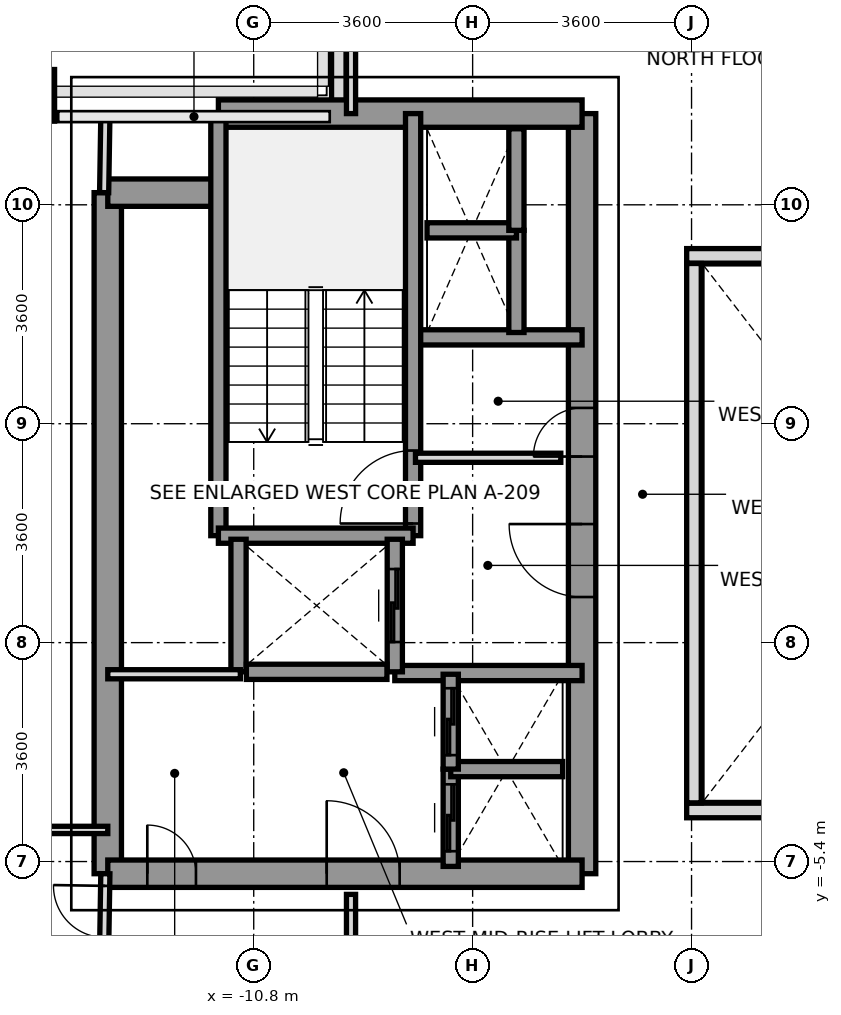
"""IFC4 building model, lengths in metres.
Left out: names, types, materials, properties, quantities, classifications, styles, units other than length and angle.
Written with IfcOpenShell. Run it as: python <this file> out.ifc"""

import sys

from ifc_helpers import new_model, si_unit, direction, frame, frame_2d, origin, origin_2d, place, context, subcontext, project, spatial, rectangle, extrude, source, transform, mapped, element, fill, save


model = new_model("IFC4")
c1 = context("Model", 3, precision=1e-05, world=origin(), true_north=direction((0.0, 1.0)))
c2 = subcontext(c1, "Body", "Model", "MODEL_VIEW")
j1 = project(units=[si_unit("LENGTHUNIT", "METRE"), si_unit("PLANEANGLEUNIT", "RADIAN")], contexts=[c1])
p1 = place(None, origin())
s1 = spatial("IfcSite", under=j1, at=p1, CompositionType="ELEMENT")
p2 = place(p1, origin())
s2 = spatial("IfcBuilding", under=s1, at=p2, CompositionType="ELEMENT")
p3 = place(p2, frame((0.0, 0.0, 141.4)))
s3 = spatial("IfcBuildingStorey", under=s2, at=p3, CompositionType="ELEMENT", Elevation=141.4)
m1 = source(origin(), c2, "Body", "SweptSolid", [
    extrude(rectangle(XDim=0.65, YDim=0.85, at=origin_2d()), origin(), (0.0, 0.0, 1.0), 3.2),
])
p4 = place(p3, frame((-14.4, 7.2, 0.0), z_axis=(0.0, 0.0, 1.0), x_axis=(1.0, 0.0, 0.0)))
e1 = element("IfcColumn", 1, at=p4, inside=s3, PredefinedType="COLUMN", context=c2, shape_type="MappedRepresentation", body=[
    mapped(m1, transform((0.0, 0.0, 0.0), x_axis=(1.0, 0.0, 0.0), y_axis=(0.0, 1.0, 0.0), z_axis=(0.0, 0.0, 1.0), scale=1.0)),
])
p5 = place(p3, frame((-9.4, 6.953, 0.0), z_axis=(0.0, 0.0, 1.0), x_axis=(0.0, 1.0, 0.0)))
e2 = element("IfcWall", 2, at=p5, inside=s3, PredefinedType="PARAPET", context=c2, shape_type="SweptSolid", body=[
    extrude(rectangle(XDim=1.519, YDim=0.24, at=frame_2d((0.76, 0.0))), origin(), (0.0, 0.0, 1.0), 1.15),
])
p6 = place(p3, frame((-13.2, -5.6, 0.0), z_axis=(0.0, 0.0, 1.0), x_axis=(0.0, 1.0, 0.0)))
e3 = element("IfcWall", 3, at=p6, inside=s3, PredefinedType="SHEAR", context=c2, shape_type="SweptSolid", body=[
    extrude(rectangle(XDim=11.2, YDim=0.45, at=frame_2d((5.6, 0.0))), origin(), (0.0, 0.0, 1.0), 3.2),
])
p7 = place(p3, frame((-5.4, -5.6, 0.0), z_axis=(0.0, 0.0, 1.0), x_axis=(0.0, 1.0, 0.0)))
e4 = element("IfcWall", 4, at=p7, inside=s3, PredefinedType="SHEAR", context=c2, shape_type="SweptSolid", body=[
    extrude(rectangle(XDim=12.5, YDim=0.45, at=frame_2d((6.25, 0.0))), origin(), (0.0, 0.0, 1.0), 3.2),
])
p8 = place(p7, frame((4.55, 0.0, 0.0)))
e5 = element("IfcOpeningElement", 5, at=p8, cuts=e4, PredefinedType="OPENING", context=c2, shape_type="SweptSolid", body=[
    extrude(rectangle(XDim=1.2, YDim=2.2, at=frame_2d((0.6, 1.1))), frame((0.0, 0.235, 0.0), z_axis=(0.0, -1.0, 0.0), x_axis=(1.0, 0.0, 0.0)), (0.0, 0.0, 1.0), 0.47),
])
p9 = place(p7, frame((6.86, 0.0, 0.0)))
e6 = element("IfcOpeningElement", 6, at=p9, cuts=e4, PredefinedType="OPENING", context=c2, shape_type="SweptSolid", body=[
    extrude(rectangle(XDim=0.8, YDim=2.1, at=frame_2d((0.4, 1.05))), frame((0.0, 0.235, 0.0), z_axis=(0.0, -1.0, 0.0), x_axis=(1.0, 0.0, 0.0)), (0.0, 0.0, 1.0), 0.47),
])
p10 = place(p3, frame((-11.381, 6.9, 0.0), z_axis=(0.0, 0.0, 1.0), x_axis=(1.0, 0.0, 0.0)))
e7 = element("IfcWall", 7, at=p10, inside=s3, PredefinedType="SHEAR", context=c2, shape_type="SweptSolid", body=[
    extrude(rectangle(XDim=5.981, YDim=0.45, at=frame_2d((2.991, 0.0))), origin(), (0.0, 0.0, 1.0), 3.2),
])
p11 = place(p3, frame((-13.2, 5.6, 0.0), z_axis=(0.0, 0.0, 1.0), x_axis=(1.0, 0.0, 0.0)))
e8 = element("IfcWall", 8, at=p11, inside=s3, PredefinedType="SHEAR", context=c2, shape_type="SweptSolid", body=[
    extrude(rectangle(XDim=1.819, YDim=0.45, at=frame_2d((0.909, 0.0))), origin(), (0.0, 0.0, 1.0), 3.2),
])
p12 = place(p3, frame((-13.2, -5.6, 0.0), z_axis=(0.0, 0.0, 1.0), x_axis=(1.0, 0.0, 0.0)))
e9 = element("IfcWall", 9, at=p12, inside=s3, PredefinedType="SHEAR", context=c2, shape_type="SweptSolid", body=[
    extrude(rectangle(XDim=7.8, YDim=0.45, at=frame_2d((3.9, 0.0))), origin(), (0.0, 0.0, 1.0), 3.2),
])
p13 = place(p12, frame((3.6, 0.0, 0.0)))
e10 = element("IfcOpeningElement", 10, at=p13, cuts=e9, PredefinedType="OPENING", context=c2, shape_type="SweptSolid", body=[
    extrude(rectangle(XDim=1.2, YDim=2.2, at=frame_2d((0.6, 1.1))), frame((0.0, 0.235, 0.0), z_axis=(0.0, -1.0, 0.0), x_axis=(1.0, 0.0, 0.0)), (0.0, 0.0, 1.0), 0.47),
])
p14 = place(p12, frame((0.65, 0.0, 0.0)))
e11 = element("IfcOpeningElement", 11, at=p14, cuts=e9, PredefinedType="OPENING", context=c2, shape_type="SweptSolid", body=[
    extrude(rectangle(XDim=0.8, YDim=2.1, at=frame_2d((0.4, 1.05))), frame((0.0, 0.235, 0.0), z_axis=(0.0, -1.0, 0.0), x_axis=(1.0, 0.0, 0.0)), (0.0, 0.0, 1.0), 0.47),
])
p15 = place(p3, frame((-8.18, 3.22, 0.0), z_axis=(0.0, 0.0, 1.0), x_axis=(1.0, 0.0, 0.0)))
e12 = element("IfcWall", 12, at=p15, inside=s3, PredefinedType="SOLIDWALL", context=c2, shape_type="SweptSolid", body=[
    extrude(rectangle(XDim=2.78, YDim=0.25, at=frame_2d((1.39, 0.0))), origin(), (0.0, 0.0, 1.0), 3.2),
])
p16 = place(p3, frame((-8.48, -2.3, 0.0), z_axis=(0.0, 0.0, 1.0), x_axis=(1.0, 0.0, 0.0)))
e13 = element("IfcWall", 13, at=p16, inside=s3, PredefinedType="SOLIDWALL", context=c2, shape_type="SweptSolid", body=[
    extrude(rectangle(XDim=3.08, YDim=0.25, at=frame_2d((1.54, 0.0))), origin(), (0.0, 0.0, 1.0), 3.2),
])
p17 = place(p3, frame((-8.179, -0.041, 0.0), z_axis=(0.0, 0.0, 1.0), x_axis=(0.0, 1.0, 0.0)))
e14 = element("IfcWall", 14, at=p17, inside=s3, PredefinedType="SOLIDWALL", context=c2, shape_type="SweptSolid", body=[
    extrude(rectangle(XDim=6.941, YDim=0.25, at=frame_2d((3.47, 0.0))), origin(), (0.0, 0.0, 1.0), 3.2),
])
p18 = place(p17, frame((0.2, 0.0, 0.0)))
e15 = element("IfcOpeningElement", 15, at=p18, cuts=e14, PredefinedType="OPENING", context=c2, shape_type="SweptSolid", body=[
    extrude(rectangle(XDim=1.2, YDim=2.2, at=frame_2d((0.6, 1.1))), frame((0.0, 0.135, 0.0), z_axis=(0.0, -1.0, 0.0), x_axis=(1.0, 0.0, 0.0)), (0.0, 0.0, 1.0), 0.27),
])
p19 = place(p3, frame((-11.381, -0.041, 0.0), z_axis=(0.0, 0.0, 1.0), x_axis=(0.0, 1.0, 0.0)))
e16 = element("IfcWall", 16, at=p19, inside=s3, PredefinedType="SOLIDWALL", context=c2, shape_type="SweptSolid", body=[
    extrude(rectangle(XDim=6.941, YDim=0.25, at=frame_2d((3.47, 0.0))), origin(), (0.0, 0.0, 1.0), 3.2),
])
p20 = place(p3, frame((-11.381, -0.041, 0.0), z_axis=(0.0, 0.0, 1.0), x_axis=(1.0, 0.0, 0.0)))
e17 = element("IfcWall", 17, at=p20, inside=s3, PredefinedType="SOLIDWALL", context=c2, shape_type="SweptSolid", body=[
    extrude(rectangle(XDim=3.202, YDim=0.25, at=frame_2d((1.601, 0.0))), origin(), (0.0, 0.0, 1.0), 3.2),
])
p21 = place(p3, frame((-11.05, -2.28, 0.0), z_axis=(0.0, 0.0, 1.0), x_axis=(0.0, 1.0, 0.0)))
e18 = element("IfcWall", 18, at=p21, inside=s3, PredefinedType="SOLIDWALL", context=c2, shape_type="SweptSolid", body=[
    extrude(rectangle(XDim=2.18, YDim=0.25, at=frame_2d((1.09, 0.0))), origin(), (0.0, 0.0, 1.0), 3.2),
])
p22 = place(p3, frame((-8.48, -2.28, 0.0), z_axis=(0.0, 0.0, 1.0), x_axis=(0.0, 1.0, 0.0)))
e19 = element("IfcWall", 19, at=p22, inside=s3, PredefinedType="SOLIDWALL", context=c2, shape_type="SweptSolid", body=[
    extrude(rectangle(XDim=2.18, YDim=0.25, at=frame_2d((1.09, 0.0))), origin(), (0.0, 0.0, 1.0), 3.2),
])
p23 = place(p22, frame((0.49, 0.0, 0.0)))
e20 = element("IfcOpeningElement", 20, at=p23, cuts=e19, PredefinedType="OPENING", context=c2, shape_type="SweptSolid", body=[
    extrude(rectangle(XDim=1.2, YDim=2.2, at=frame_2d((0.6, 1.1))), frame((0.0, 0.135, 0.0), z_axis=(0.0, -1.0, 0.0), x_axis=(1.0, 0.0, 0.0)), (0.0, 0.0, 1.0), 0.27),
])
p24 = place(p3, frame((-10.921, -2.28, 0.0), z_axis=(0.0, 0.0, 1.0), x_axis=(1.0, 0.0, 0.0)))
e21 = element("IfcWall", 21, at=p24, inside=s3, PredefinedType="SOLIDWALL", context=c2, shape_type="SweptSolid", body=[
    extrude(rectangle(XDim=2.312, YDim=0.25, at=frame_2d((1.156, 0.0))), origin(), (0.0, 0.0, 1.0), 3.2),
])
p25 = place(p3, frame((-7.56, -5.48, 0.0), z_axis=(0.0, 0.0, 1.0), x_axis=(0.0, 1.0, 0.0)))
e22 = element("IfcWall", 22, at=p25, inside=s3, PredefinedType="SOLIDWALL", context=c2, shape_type="SweptSolid", body=[
    extrude(rectangle(XDim=1.6, YDim=0.25, at=frame_2d((0.8, 0.0))), origin(), (0.0, 0.0, 1.0), 3.2),
])
p26 = place(p25, frame((0.25, 0.0, 0.0)))
e23 = element("IfcOpeningElement", 23, at=p26, cuts=e22, PredefinedType="OPENING", context=c2, shape_type="SweptSolid", body=[
    extrude(rectangle(XDim=1.1, YDim=2.2, at=frame_2d((0.55, 1.1))), frame((0.0, 0.135, 0.0), z_axis=(0.0, -1.0, 0.0), x_axis=(1.0, 0.0, 0.0)), (0.0, 0.0, 1.0), 0.27),
])
p27 = place(p3, frame((-7.56, -3.88, 0.0), z_axis=(0.0, 0.0, 1.0), x_axis=(1.0, 0.0, 0.0)))
e24 = element("IfcWall", 24, at=p27, inside=s3, PredefinedType="SOLIDWALL", context=c2, shape_type="SweptSolid", body=[
    extrude(rectangle(XDim=1.84, YDim=0.25, at=frame_2d((0.92, 0.0))), origin(), (0.0, 0.0, 1.0), 3.2),
])
p28 = place(p3, frame((-7.56, -3.88, 0.0), z_axis=(0.0, 0.0, 1.0), x_axis=(0.0, 1.0, 0.0)))
e25 = element("IfcWall", 25, at=p28, inside=s3, PredefinedType="SOLIDWALL", context=c2, shape_type="SweptSolid", body=[
    extrude(rectangle(XDim=1.56, YDim=0.25, at=frame_2d((0.78, 0.0))), origin(), (0.0, 0.0, 1.0), 3.2),
])
p29 = place(p28, frame((0.23, 0.0, 0.0)))
e26 = element("IfcOpeningElement", 26, at=p29, cuts=e25, PredefinedType="OPENING", context=c2, shape_type="SweptSolid", body=[
    extrude(rectangle(XDim=1.1, YDim=2.2, at=frame_2d((0.55, 1.1))), frame((0.0, 0.135, 0.0), z_axis=(0.0, -1.0, 0.0), x_axis=(1.0, 0.0, 0.0)), (0.0, 0.0, 1.0), 0.27),
])
p30 = place(p3, frame((-6.48, 3.3, 0.0), z_axis=(0.0, 0.0, 1.0), x_axis=(0.0, 1.0, 0.0)))
e27 = element("IfcWall", 27, at=p30, inside=s3, PredefinedType="SOLIDWALL", context=c2, shape_type="SweptSolid", body=[
    extrude(rectangle(XDim=1.68, YDim=0.25, at=frame_2d((0.84, 0.0))), origin(), (0.0, 0.0, 1.0), 3.2),
])
p31 = place(p3, frame((-7.95, 4.98, 0.0), z_axis=(0.0, 0.0, 1.0), x_axis=(1.0, 0.0, 0.0)))
e28 = element("IfcWall", 28, at=p31, inside=s3, PredefinedType="SOLIDWALL", context=c2, shape_type="SweptSolid", body=[
    extrude(rectangle(XDim=1.47, YDim=0.25, at=frame_2d((0.735, 0.0))), origin(), (0.0, 0.0, 1.0), 3.2),
])
p32 = place(p3, frame((-6.48, 4.98, 0.0), z_axis=(0.0, 0.0, 1.0), x_axis=(0.0, 1.0, 0.0)))
e29 = element("IfcWall", 29, at=p32, inside=s3, PredefinedType="SOLIDWALL", context=c2, shape_type="SweptSolid", body=[
    extrude(rectangle(XDim=1.67, YDim=0.25, at=frame_2d((0.835, 0.0))), origin(), (0.0, 0.0, 1.0), 3.2),
])
p33 = place(p3, frame((-8.14, 1.24, 0.0), z_axis=(0.0, 0.0, 1.0), x_axis=(1.0, 0.0, 0.0)))
e30 = element("IfcWall", 30, at=p33, inside=s3, PredefinedType="PARTITIONING", context=c2, shape_type="SweptSolid", body=[
    extrude(rectangle(XDim=2.39, YDim=0.15, at=frame_2d((1.195, 0.0))), origin(), (0.0, 0.0, 1.0), 2.3),
])
p34 = place(p3, frame((-13.2, -2.32, 0.0), z_axis=(0.0, 0.0, 1.0), x_axis=(1.0, 0.0, 0.0)))
e31 = element("IfcWall", 31, at=p34, inside=s3, PredefinedType="PARTITIONING", context=c2, shape_type="SweptSolid", body=[
    extrude(rectangle(XDim=2.18, YDim=0.15, at=frame_2d((1.09, 0.0))), origin(), (0.0, 0.0, 1.0), 3.2),
])
p35 = place(p3, frame((-9.2, 6.9, 0.0), z_axis=(0.0, 0.0, 1.0), x_axis=(0.0, 1.0, 0.0)))
e32 = element("IfcWall", 32, at=p35, inside=s3, PredefinedType="PARTITIONING", context=c2, shape_type="SweptSolid", body=[
    extrude(rectangle(XDim=8.78, YDim=0.15, at=frame_2d((4.39, 0.0))), origin(), (0.0, 0.0, 1.0), 2.7),
])
p36 = place(p3, frame((-9.2, -15.68, 0.0), z_axis=(0.0, 0.0, 1.0), x_axis=(0.0, 1.0, 0.0)))
e33 = element("IfcWall", 33, at=p36, inside=s3, PredefinedType="PARTITIONING", context=c2, shape_type="SweptSolid", body=[
    extrude(rectangle(XDim=9.74, YDim=0.15, at=frame_2d((4.87, 0.0))), origin(), (0.0, 0.0, 1.0), 2.7),
])
p37 = place(p3, frame((-13.26, 5.6, 0.0), z_axis=(0.0, 0.0, 1.0), x_axis=(0.016013571389, 0.999871774545, 0.0)))
e34 = element("IfcWall", 34, at=p37, inside=s3, PredefinedType="PARTITIONING", context=c2, shape_type="SweptSolid", body=[
    extrude(rectangle(XDim=1.25, YDim=0.15, at=frame_2d((0.625, 0.0))), origin(), (0.0, 0.0, 1.0), 3.2),
])
p38 = place(p3, frame((-13.26, -6.85, 0.0), z_axis=(0.0, 0.0, 1.0), x_axis=(0.016013571389, 0.999871774545, 0.0)))
e35 = element("IfcWall", 35, at=p38, inside=s3, PredefinedType="PARTITIONING", context=c2, shape_type="SweptSolid", body=[
    extrude(rectangle(XDim=1.25, YDim=0.15, at=frame_2d((0.625, 0.0))), origin(), (0.0, 0.0, 1.0), 3.2),
])
p39 = place(p38, frame((0.2, 0.0, 0.0)))
e36 = element("IfcOpeningElement", 36, at=p39, cuts=e35, PredefinedType="OPENING", context=c2, shape_type="SweptSolid", body=[
    extrude(rectangle(XDim=0.85, YDim=2.1, at=frame_2d((0.425, 1.05))), frame((0.0, 0.085, 0.0), z_axis=(0.0, -1.0, 0.0), x_axis=(1.0, 0.0, 0.0)), (0.0, 0.0, 1.0), 0.17),
])
p40 = place(p3, frame((-19.17, -4.88, 0.0), z_axis=(0.0, 0.0, 1.0), x_axis=(1.0, 0.0, 0.0)))
e37 = element("IfcWall", 37, at=p40, inside=s3, PredefinedType="PARTITIONING", context=c2, shape_type="SweptSolid", body=[
    extrude(rectangle(XDim=5.97, YDim=0.12, at=frame_2d((2.985, 0.0))), origin(), (0.0, 0.0, 1.0), 2.75),
])
p41 = place(p40, frame((1.45, 0.0, 0.0)))
e38 = element("IfcOpeningElement", 38, at=p41, cuts=e37, PredefinedType="OPENING", context=c2, shape_type="SweptSolid", body=[
    extrude(rectangle(XDim=0.95, YDim=2.15, at=frame_2d((0.475, 1.075))), frame((0.0, 0.07, 0.0), z_axis=(0.0, -1.0, 0.0), x_axis=(1.0, 0.0, 0.0)), (0.0, 0.0, 1.0), 0.14),
])
for number, where, z_axis, x_axis in (
    (39, (-3.68, -4.56, 0.0), (0.0, 0.0, 1.0), (1.0, 0.0, 0.0)),
    (40, (-3.68, 4.56, 0.0), (0.0, 0.0, 1.0), (1.0, 0.0, 0.0)),
):
    element("IfcWall", number, at=place(p3, frame(where, z_axis=z_axis, x_axis=x_axis)), inside=s3, PredefinedType="PARAPET", context=c2, shape_type="SweptSolid", body=[
        extrude(rectangle(XDim=7.36, YDim=0.24, at=frame_2d((3.68, 0.0))), origin(), (0.0, 0.0, 1.0), 1.15),
    ])
p42 = place(p3, frame((-3.56, -4.435, 0.0), z_axis=(0.0, 0.0, 1.0), x_axis=(0.0, 1.0, 0.0)))
e41 = element("IfcWall", 41, at=p42, inside=s3, PredefinedType="PARAPET", context=c2, shape_type="SweptSolid", body=[
    extrude(rectangle(XDim=8.87, YDim=0.24, at=frame_2d((4.435, 0.0))), origin(), (0.0, 0.0, 1.0), 1.15),
])
m2 = source(origin(), c2, "Body", "SweptSolid", [
    extrude(rectangle(XDim=1.2, YDim=2.2, at=frame_2d((0.6, 1.1))), frame((0.0, 0.025, 0.0), z_axis=(0.0, -1.0, 0.0), x_axis=(1.0, 0.0, 0.0)), (0.0, 0.0, 1.0), 0.05),
])
p43 = place(p18, origin())
e42 = element("IfcDoor", 42, at=p43, inside=s3, OperationType="SINGLE_SWING_LEFT", PredefinedType="DOOR", context=c2, shape_type="MappedRepresentation", body=[
    mapped(m2, transform((0.0, 0.0, 0.0), x_axis=(1.0, 0.0, 0.0), y_axis=(0.0, 1.0, 0.0), z_axis=(0.0, 0.0, 1.0), scale=1.0)),
])
fill(e15, e42)
p44 = place(p8, origin())
e43 = element("IfcDoor", 43, at=p44, inside=s3, OperationType="SINGLE_SWING_RIGHT", PredefinedType="DOOR", context=c2, shape_type="MappedRepresentation", body=[
    mapped(m2, transform((0.0, 0.0, 0.0), x_axis=(1.0, 0.0, 0.0), y_axis=(0.0, 1.0, 0.0), z_axis=(0.0, 0.0, 1.0), scale=1.0)),
])
fill(e5, e43)
p45 = place(p13, origin())
e44 = element("IfcDoor", 44, at=p45, inside=s3, OperationType="SINGLE_SWING_LEFT", PredefinedType="DOOR", context=c2, shape_type="MappedRepresentation", body=[
    mapped(m2, transform((0.0, 0.0, 0.0), x_axis=(1.0, 0.0, 0.0), y_axis=(0.0, 1.0, 0.0), z_axis=(0.0, 0.0, 1.0), scale=1.0)),
])
fill(e10, e44)
m3 = source(origin(), c2, "Body", "SweptSolid", [
    extrude(rectangle(XDim=0.8, YDim=2.1, at=frame_2d((0.4, 1.05))), frame((0.0, 0.025, 0.0), z_axis=(0.0, -1.0, 0.0), x_axis=(1.0, 0.0, 0.0)), (0.0, 0.0, 1.0), 0.05),
])
p46 = place(p9, origin())
e45 = element("IfcDoor", 45, at=p46, inside=s3, OperationType="SINGLE_SWING_LEFT", PredefinedType="DOOR", context=c2, shape_type="MappedRepresentation", body=[
    mapped(m3, transform((0.0, 0.0, 0.0), x_axis=(1.0, 0.0, 0.0), y_axis=(0.0, 1.0, 0.0), z_axis=(0.0, 0.0, 1.0), scale=1.0)),
])
fill(e6, e45)
p47 = place(p14, origin())
e46 = element("IfcDoor", 46, at=p47, inside=s3, OperationType="SINGLE_SWING_LEFT", PredefinedType="DOOR", context=c2, shape_type="MappedRepresentation", body=[
    mapped(m3, transform((0.0, 0.0, 0.0), x_axis=(1.0, 0.0, 0.0), y_axis=(0.0, 1.0, 0.0), z_axis=(0.0, 0.0, 1.0), scale=1.0)),
])
fill(e11, e46)
p48 = place(p23, origin())
e47 = element("IfcDoor", 47, at=p48, inside=s3, OperationType="SLIDING_TO_RIGHT", PredefinedType="DOOR", context=c2, shape_type="MappedRepresentation", body=[
    mapped(m2, transform((0.0, 0.0, 0.0), x_axis=(1.0, 0.0, 0.0), y_axis=(0.0, 1.0, 0.0), z_axis=(0.0, 0.0, 1.0), scale=1.0)),
])
fill(e20, e47)
m4 = source(origin(), c2, "Body", "SweptSolid", [
    extrude(rectangle(XDim=1.1, YDim=2.2, at=frame_2d((0.55, 1.1))), frame((0.0, 0.025, 0.0), z_axis=(0.0, -1.0, 0.0), x_axis=(1.0, 0.0, 0.0)), (0.0, 0.0, 1.0), 0.05),
])
p49 = place(p26, origin())
e48 = element("IfcDoor", 48, at=p49, inside=s3, OperationType="SLIDING_TO_LEFT", PredefinedType="DOOR", context=c2, shape_type="MappedRepresentation", body=[
    mapped(m4, transform((0.0, 0.0, 0.0), x_axis=(1.0, 0.0, 0.0), y_axis=(0.0, 1.0, 0.0), z_axis=(0.0, 0.0, 1.0), scale=1.0)),
])
fill(e23, e48)
p50 = place(p29, origin())
e49 = element("IfcDoor", 49, at=p50, inside=s3, OperationType="SLIDING_TO_LEFT", PredefinedType="DOOR", context=c2, shape_type="MappedRepresentation", body=[
    mapped(m4, transform((0.0, 0.0, 0.0), x_axis=(1.0, 0.0, 0.0), y_axis=(0.0, 1.0, 0.0), z_axis=(0.0, 0.0, 1.0), scale=1.0)),
])
fill(e26, e49)
m5 = source(origin(), c2, "Body", "SweptSolid", [
    extrude(rectangle(XDim=0.85, YDim=2.1, at=frame_2d((0.425, 1.05))), frame((0.0, 0.025, 0.0), z_axis=(0.0, -1.0, 0.0), x_axis=(1.0, 0.0, 0.0)), (0.0, 0.0, 1.0), 0.05),
])
p51 = place(p39, origin())
e50 = element("IfcDoor", 50, at=p51, inside=s3, OperationType="SINGLE_SWING_RIGHT", PredefinedType="DOOR", context=c2, shape_type="MappedRepresentation", body=[
    mapped(m5, transform((0.0, 0.0, 0.0), x_axis=(1.0, 0.0, 0.0), y_axis=(0.0, 1.0, 0.0), z_axis=(0.0, 0.0, 1.0), scale=1.0)),
])
fill(e36, e50)
save(model, sys.argv[1])
